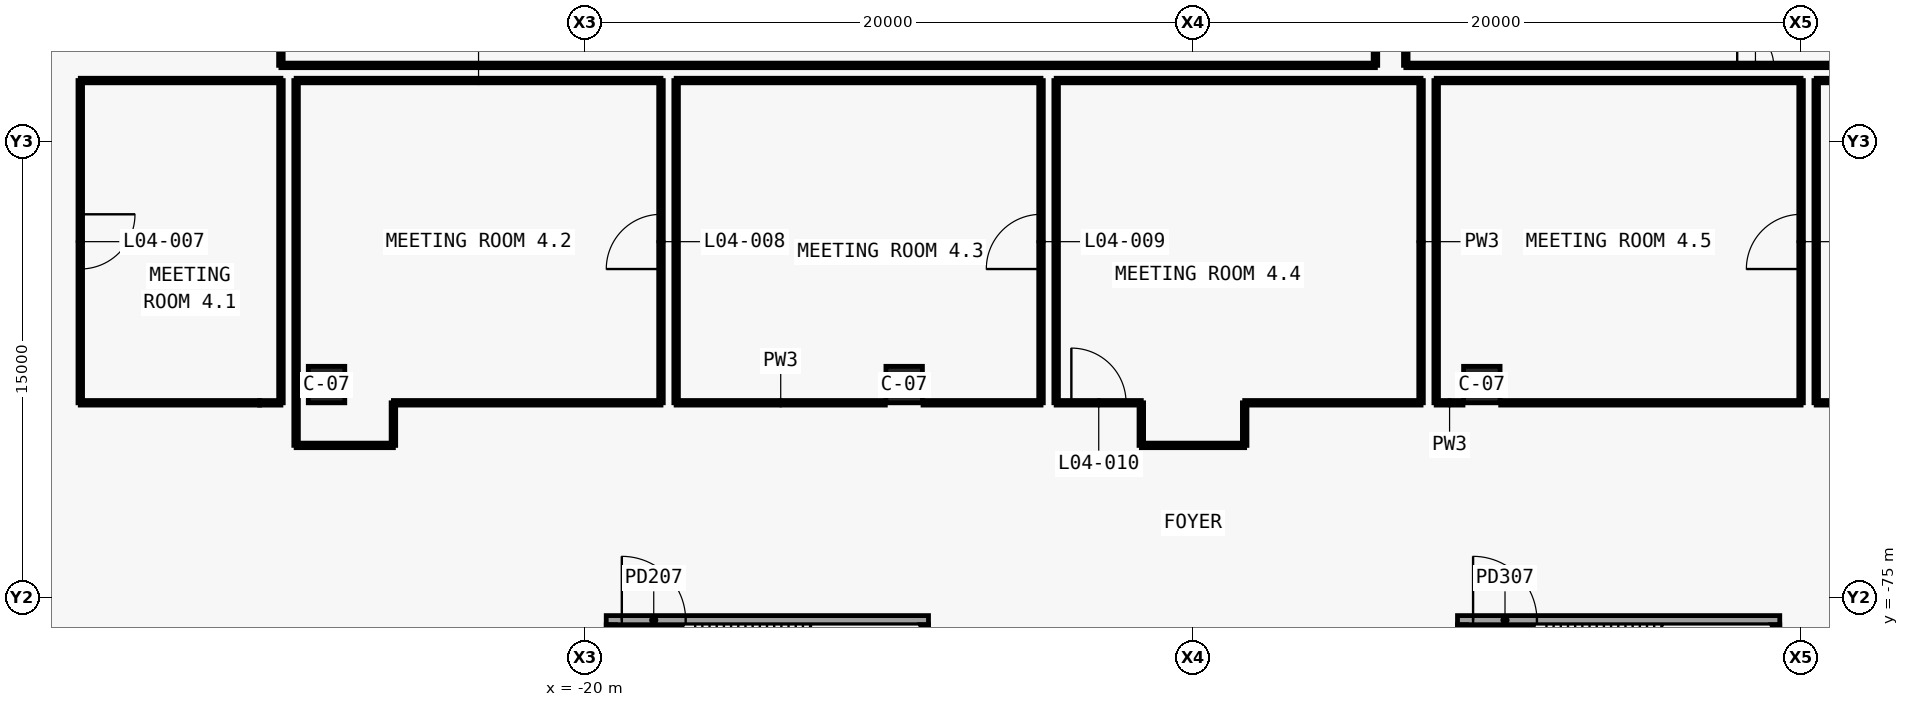
"""IFC4 building model, lengths in metres.
Left out: names, types, materials, properties, quantities, classifications, styles, units other than length and angle.
Written with IfcOpenShell. Run it as: python <this file> out.ifc"""

import sys

from ifc_helpers import new_model, si_unit, direction, frame, frame_2d, origin, origin_2d, place, context, subcontext, project, spatial, rectangle, extrude, element, fill, save


model = new_model("IFC4")
c1 = context("Model", 3, precision=1e-05, world=origin(), true_north=direction((0.0, 1.0)))
c2 = subcontext(c1, "Body", "Model", "MODEL_VIEW")
j1 = project(units=[si_unit("LENGTHUNIT", "METRE"), si_unit("PLANEANGLEUNIT", "RADIAN")], contexts=[c1])
p1 = place(None, origin())
s1 = spatial("IfcSite", under=j1, at=p1, CompositionType="ELEMENT")
p2 = place(p1, origin())
s2 = spatial("IfcBuilding", under=s1, at=p2, CompositionType="ELEMENT")
p3 = place(p2, frame((0.0, 0.0, 32.0)))
s3 = spatial("IfcBuildingStorey", under=s2, at=p3, CompositionType="ELEMENT", Elevation=32.0)
p4 = place(p3, frame((-19.3, -75.75, 0.0), z_axis=(0.0, 0.0, 1.0), x_axis=(1.0, 0.0, 0.0)))
e1 = element("IfcWall", 1, at=p4, inside=s3, PredefinedType="SOLIDWALL", context=c2, shape_type="SweptSolid", body=[
    extrude(rectangle(XDim=10.6, YDim=0.3, at=frame_2d((5.3, 0.0))), origin(), (0.0, 0.0, 1.0), 5.5),
])
p5 = place(p4, frame((0.512, 0.0, 0.0)))
e2 = element("IfcOpeningElement", 2, at=p5, cuts=e1, PredefinedType="OPENING", context=c2, shape_type="SweptSolid", body=[
    extrude(rectangle(XDim=2.1, YDim=2.1, at=frame_2d((1.05, 1.05))), frame((0.0, 0.16, 0.0), z_axis=(0.0, -1.0, 0.0), x_axis=(1.0, 0.0, 0.0)), (0.0, 0.0, 1.0), 0.32),
])
for number, where, z_axis, x_axis in (
    (3, (-19.15, -81.1, 0.0), (0.0, 0.0, 1.0), (0.0, 1.0, 0.0)),
    (4, (-8.85, -81.1, 0.0), (0.0, 0.0, 1.0), (0.0, 1.0, 0.0)),
):
    element("IfcWall", number, at=place(p3, frame(where, z_axis=z_axis, x_axis=x_axis)), inside=s3, PredefinedType="SOLIDWALL", context=c2, shape_type="SweptSolid", body=[
        extrude(rectangle(XDim=5.2, YDim=0.3, at=frame_2d((2.6, 0.0))), origin(), (0.0, 0.0, 1.0), 5.5),
    ])
p6 = place(p3, frame((8.7, -75.75, 0.0), z_axis=(0.0, 0.0, 1.0), x_axis=(1.0, 0.0, 0.0)))
e5 = element("IfcWall", 5, at=p6, inside=s3, PredefinedType="SOLIDWALL", context=c2, shape_type="SweptSolid", body=[
    extrude(rectangle(XDim=10.6, YDim=0.3, at=frame_2d((5.3, 0.0))), origin(), (0.0, 0.0, 1.0), 5.5),
])
p7 = place(p6, frame((0.512, 0.0, 0.0)))
e6 = element("IfcOpeningElement", 6, at=p7, cuts=e5, PredefinedType="OPENING", context=c2, shape_type="SweptSolid", body=[
    extrude(rectangle(XDim=2.1, YDim=2.1, at=frame_2d((1.05, 1.05))), frame((0.0, 0.16, 0.0), z_axis=(0.0, -1.0, 0.0), x_axis=(1.0, 0.0, 0.0)), (0.0, 0.0, 1.0), 0.32),
])
for number, where, z_axis, x_axis in (
    (7, (8.85, -81.1, 0.0), (0.0, 0.0, 1.0), (0.0, 1.0, 0.0)),
    (8, (19.15, -81.1, 0.0), (0.0, 0.0, 1.0), (0.0, 1.0, 0.0)),
):
    element("IfcWall", number, at=place(p3, frame(where, z_axis=z_axis, x_axis=x_axis)), inside=s3, PredefinedType="SOLIDWALL", context=c2, shape_type="SweptSolid", body=[
        extrude(rectangle(XDim=5.2, YDim=0.3, at=frame_2d((2.6, 0.0))), origin(), (0.0, 0.0, 1.0), 5.5),
    ])
for number, where, z_axis, x_axis in (
    (9, (-28.5, -68.0, 0.0), (0.0, 0.0, 1.0), (1.0, 0.0, 0.0)),
    (10, (-9.5, -68.0, 0.0), (0.0, 0.0, 1.0), (1.0, 0.0, 0.0)),
    (11, (9.5, -68.0, 0.0), (0.0, 0.0, 1.0), (1.0, 0.0, 0.0)),
):
    element("IfcColumn", number, at=place(p3, frame(where, z_axis=z_axis, x_axis=x_axis)), inside=s3, PredefinedType="COLUMN", context=c2, shape_type="SweptSolid", body=[
        extrude(rectangle(XDim=1.2, YDim=1.2, at=origin_2d()), origin(), (0.0, 0.0, 1.0), 5.5),
    ])
p8 = place(p3, frame((-30.699, -68.601, 0.0), z_axis=(0.0, 0.0, 1.0), x_axis=(1.0, 0.0, 0.0)))
e12 = element("IfcWall", 12, at=p8, inside=s3, PredefinedType="PARTITIONING", context=c2, shape_type="SweptSolid", body=[
    extrude(rectangle(XDim=0.699, YDim=0.15, at=frame_2d((0.35, 0.0))), origin(), (0.0, 0.0, 1.0), 5.1),
])
p9 = place(p3, frame((-29.999, -68.6, 0.0), z_axis=(0.0, 0.0, 1.0), x_axis=(0.0, 1.0, 0.0)))
e13 = element("IfcWall", 13, at=p9, inside=s3, PredefinedType="PARTITIONING", context=c2, shape_type="SweptSolid", body=[
    extrude(rectangle(XDim=10.6, YDim=0.15, at=frame_2d((5.3, 0.0))), origin(), (0.0, 0.0, 1.0), 4.28),
])
p10 = place(p3, frame((-30.0, -57.999, 0.0), z_axis=(0.0, 0.0, 1.0), x_axis=(-1.0, 0.0, 0.0)))
e14 = element("IfcWall", 14, at=p10, inside=s3, PredefinedType="PARTITIONING", context=c2, shape_type="SweptSolid", body=[
    extrude(rectangle(XDim=6.599, YDim=0.15, at=frame_2d((3.3, 0.0))), origin(), (0.0, 0.0, 1.0), 5.1),
])
p11 = place(p3, frame((-17.499, -68.599, 0.0), z_axis=(0.0, 0.0, 1.0), x_axis=(0.0, 1.0, 0.0)))
e15 = element("IfcWall", 15, at=p11, inside=s3, PredefinedType="PARTITIONING", context=c2, shape_type="SweptSolid", body=[
    extrude(rectangle(XDim=10.599, YDim=0.15, at=frame_2d((5.3, 0.0))), origin(), (0.0, 0.0, 1.0), 4.28),
])
p12 = place(p11, frame((4.399, 0.0, 0.0)))
e16 = element("IfcOpeningElement", 16, at=p12, cuts=e15, PredefinedType="OPENING", context=c2, shape_type="SweptSolid", body=[
    extrude(rectangle(XDim=1.8, YDim=2.4, at=frame_2d((0.9, 1.2))), frame((0.0, 0.085, 0.0), z_axis=(0.0, -1.0, 0.0), x_axis=(1.0, 0.0, 0.0)), (0.0, 0.0, 1.0), 0.17),
])
for number, where, z_axis, x_axis in (
    (17, (-17.5, -57.999, 0.0), (0.0, 0.0, 1.0), (-1.0, 0.0, 0.0)),
    (18, (-29.501, -58.0, 0.0), (0.0, 0.0, 1.0), (0.0, -1.0, 0.0)),
):
    element("IfcWall", number, at=place(p3, frame(where, z_axis=z_axis, x_axis=x_axis)), inside=s3, PredefinedType="PARTITIONING", context=c2, shape_type="SweptSolid", body=[
        extrude(rectangle(XDim=12.0, YDim=0.15, at=frame_2d((6.0, 0.0))), origin(), (0.0, 0.0, 1.0), 4.28),
    ])
p13 = place(p3, frame((-29.5, -70.001, 0.0), z_axis=(0.0, 0.0, 1.0), x_axis=(1.0, 0.0, 0.0)))
e19 = element("IfcWall", 19, at=p13, inside=s3, PredefinedType="PARTITIONING", context=c2, shape_type="SweptSolid", body=[
    extrude(rectangle(XDim=3.199, YDim=0.15, at=frame_2d((1.6, 0.0))), origin(), (0.0, 0.0, 1.0), 4.28),
])
p14 = place(p3, frame((-4.999, -68.599, 0.0), z_axis=(0.0, 0.0, 1.0), x_axis=(0.0, 1.0, 0.0)))
e20 = element("IfcWall", 20, at=p14, inside=s3, PredefinedType="PARTITIONING", context=c2, shape_type="SweptSolid", body=[
    extrude(rectangle(XDim=10.599, YDim=0.15, at=frame_2d((5.3, 0.0))), origin(), (0.0, 0.0, 1.0), 4.28),
])
p15 = place(p14, frame((4.399, 0.0, 0.0)))
e21 = element("IfcOpeningElement", 21, at=p15, cuts=e20, PredefinedType="OPENING", context=c2, shape_type="SweptSolid", body=[
    extrude(rectangle(XDim=1.8, YDim=2.4, at=frame_2d((0.9, 1.2))), frame((0.0, 0.085, 0.0), z_axis=(0.0, -1.0, 0.0), x_axis=(1.0, 0.0, 0.0)), (0.0, 0.0, 1.0), 0.17),
])
p16 = place(p3, frame((-5.0, -57.999, 0.0), z_axis=(0.0, 0.0, 1.0), x_axis=(-1.0, 0.0, 0.0)))
e22 = element("IfcWall", 22, at=p16, inside=s3, PredefinedType="PARTITIONING", context=c2, shape_type="SweptSolid", body=[
    extrude(rectangle(XDim=12.0, YDim=0.15, at=frame_2d((6.0, 0.0))), origin(), (0.0, 0.0, 1.0), 4.28),
])
for number, where, z_axis, x_axis in (
    (23, (-17.001, -58.0, 0.0), (0.0, 0.0, 1.0), (0.0, -1.0, 0.0)),
    (24, (7.501, -68.599, 0.0), (0.0, 0.0, 1.0), (0.0, 1.0, 0.0)),
):
    element("IfcWall", number, at=place(p3, frame(where, z_axis=z_axis, x_axis=x_axis)), inside=s3, PredefinedType="PARTITIONING", context=c2, shape_type="SweptSolid", body=[
        extrude(rectangle(XDim=10.599, YDim=0.15, at=frame_2d((5.3, 0.0))), origin(), (0.0, 0.0, 1.0), 4.28),
    ])
p17 = place(p3, frame((7.5, -57.999, 0.0), z_axis=(0.0, 0.0, 1.0), x_axis=(-1.0, 0.0, 0.0)))
e25 = element("IfcWall", 25, at=p17, inside=s3, PredefinedType="PARTITIONING", context=c2, shape_type="SweptSolid", body=[
    extrude(rectangle(XDim=12.0, YDim=0.15, at=frame_2d((6.0, 0.0))), origin(), (0.0, 0.0, 1.0), 5.1),
])
p18 = place(p3, frame((-4.501, -58.0, 0.0), z_axis=(0.0, 0.0, 1.0), x_axis=(0.0, -1.0, 0.0)))
e26 = element("IfcWall", 26, at=p18, inside=s3, PredefinedType="PARTITIONING", context=c2, shape_type="SweptSolid", body=[
    extrude(rectangle(XDim=10.599, YDim=0.15, at=frame_2d((5.3, 0.0))), origin(), (0.0, 0.0, 1.0), 4.28),
])
p19 = place(p3, frame((20.001, -68.599, 0.0), z_axis=(0.0, 0.0, 1.0), x_axis=(0.0, 1.0, 0.0)))
e27 = element("IfcWall", 27, at=p19, inside=s3, PredefinedType="PARTITIONING", context=c2, shape_type="SweptSolid", body=[
    extrude(rectangle(XDim=10.599, YDim=0.15, at=frame_2d((5.3, 0.0))), origin(), (0.0, 0.0, 1.0), 4.28),
])
p20 = place(p19, frame((4.399, 0.0, 0.0)))
e28 = element("IfcOpeningElement", 28, at=p20, cuts=e27, PredefinedType="OPENING", context=c2, shape_type="SweptSolid", body=[
    extrude(rectangle(XDim=1.8, YDim=2.4, at=frame_2d((0.9, 1.2))), frame((0.0, 0.085, 0.0), z_axis=(0.0, -1.0, 0.0), x_axis=(1.0, 0.0, 0.0)), (0.0, 0.0, 1.0), 0.17),
])
p21 = place(p3, frame((20.0, -57.999, 0.0), z_axis=(0.0, 0.0, 1.0), x_axis=(-1.0, 0.0, 0.0)))
e29 = element("IfcWall", 29, at=p21, inside=s3, PredefinedType="PARTITIONING", context=c2, shape_type="SweptSolid", body=[
    extrude(rectangle(XDim=12.0, YDim=0.15, at=frame_2d((6.0, 0.0))), origin(), (0.0, 0.0, 1.0), 4.28),
])
p22 = place(p3, frame((7.999, -58.0, 0.0), z_axis=(0.0, 0.0, 1.0), x_axis=(0.0, -1.0, 0.0)))
e30 = element("IfcWall", 30, at=p22, inside=s3, PredefinedType="PARTITIONING", context=c2, shape_type="SweptSolid", body=[
    extrude(rectangle(XDim=10.599, YDim=0.15, at=frame_2d((5.3, 0.0))), origin(), (0.0, 0.0, 1.0), 4.28),
])
p23 = place(p3, frame((32.5, -57.999, 0.0), z_axis=(0.0, 0.0, 1.0), x_axis=(-1.0, 0.0, 0.0)))
e31 = element("IfcWall", 31, at=p23, inside=s3, PredefinedType="PARTITIONING", context=c2, shape_type="SweptSolid", body=[
    extrude(rectangle(XDim=12.0, YDim=0.15, at=frame_2d((6.0, 0.0))), origin(), (0.0, 0.0, 1.0), 4.28),
])
p24 = place(p3, frame((20.499, -58.0, 0.0), z_axis=(0.0, 0.0, 1.0), x_axis=(0.0, -1.0, 0.0)))
e32 = element("IfcWall", 32, at=p24, inside=s3, PredefinedType="PARTITIONING", context=c2, shape_type="SweptSolid", body=[
    extrude(rectangle(XDim=10.599, YDim=0.15, at=frame_2d((5.3, 0.0))), origin(), (0.0, 0.0, 1.0), 4.28),
])
p25 = place(p3, frame((-30.001, -46.0, 0.0), z_axis=(0.0, 0.0, 1.0), x_axis=(0.0, -1.0, 0.0)))
e33 = element("IfcWall", 33, at=p25, inside=s3, PredefinedType="PARTITIONING", context=c2, shape_type="SweptSolid", body=[
    extrude(rectangle(XDim=11.5, YDim=0.15, at=frame_2d((5.75, 0.0))), origin(), (0.0, 0.0, 1.0), 4.28),
])
p26 = place(p3, frame((-30.0, -57.501, 0.0), z_axis=(0.0, 0.0, 1.0), x_axis=(1.0, 0.0, 0.0)))
e34 = element("IfcWall", 34, at=p26, inside=s3, PredefinedType="PARTITIONING", context=c2, shape_type="SweptSolid", body=[
    extrude(rectangle(XDim=36.0, YDim=0.15, at=frame_2d((18.0, 0.0))), origin(), (0.0, 0.0, 1.0), 4.28),
])
for number, where, z_axis, x_axis in (
    (35, (6.001, -57.5, 0.0), (0.0, 0.0, 1.0), (0.0, 1.0, 0.0)),
    (36, (6.999, -55.587, 0.0), (0.0, 0.0, 1.0), (0.0, -1.0, 0.0)),
):
    element("IfcWall", number, at=place(p3, frame(where, z_axis=z_axis, x_axis=x_axis)), inside=s3, PredefinedType="PARTITIONING", context=c2, shape_type="SweptSolid", body=[
        extrude(rectangle(XDim=1.913, YDim=0.15, at=frame_2d((0.957, 0.0))), origin(), (0.0, 0.0, 1.0), 4.63),
    ])
p27 = place(p3, frame((7.0, -57.501, 0.0), z_axis=(0.0, 0.0, 1.0), x_axis=(1.0, 0.0, 0.0)))
e37 = element("IfcWall", 37, at=p27, inside=s3, PredefinedType="PARTITIONING", context=c2, shape_type="SweptSolid", body=[
    extrude(rectangle(XDim=23.0, YDim=0.15, at=frame_2d((11.5, 0.0))), origin(), (0.0, 0.0, 1.0), 4.28),
])
p28 = place(p27, frame((10.9, 0.0, 0.0)))
e38 = element("IfcOpeningElement", 38, at=p28, cuts=e37, PredefinedType="OPENING", context=c2, shape_type="SweptSolid", body=[
    extrude(rectangle(XDim=1.2, YDim=2.4, at=frame_2d((0.6, 1.2))), frame((0.0, 0.085, 0.0), z_axis=(0.0, -1.0, 0.0), x_axis=(1.0, 0.0, 0.0)), (0.0, 0.0, 1.0), 0.17),
])
p29 = place(p3, frame((-1.699, -70.001, 0.0), z_axis=(0.0, 0.0, 1.0), x_axis=(1.0, 0.0, 0.0)))
e39 = element("IfcWall", 39, at=p29, inside=s3, PredefinedType="PARTITIONING", context=c2, shape_type="SweptSolid", body=[
    extrude(rectangle(XDim=3.398, YDim=0.15, at=frame_2d((1.699, 0.0))), origin(), (0.0, 0.0, 1.0), 5.1),
])
p30 = place(p3, frame((-36.6, -57.998, 0.0), z_axis=(0.0, 0.0, 1.0), x_axis=(0.0, -1.0, 0.0)))
e40 = element("IfcWall", 40, at=p30, inside=s3, PredefinedType="PARTITIONING", context=c2, shape_type="SweptSolid", body=[
    extrude(rectangle(XDim=10.602, YDim=0.15, at=frame_2d((5.301, 0.0))), origin(), (0.0, 0.0, 1.0), 4.28),
])
p31 = place(p30, frame((4.401, 0.0, 0.0)))
e41 = element("IfcOpeningElement", 41, at=p31, cuts=e40, PredefinedType="OPENING", context=c2, shape_type="SweptSolid", body=[
    extrude(rectangle(XDim=1.8, YDim=2.4, at=frame_2d((0.9, 1.2))), frame((0.0, 0.085, 0.0), z_axis=(0.0, -1.0, 0.0), x_axis=(1.0, 0.0, 0.0)), (0.0, 0.0, 1.0), 0.17),
])
p32 = place(p3, frame((-36.6, -68.6, 0.0), z_axis=(0.0, 0.0, 1.0), x_axis=(1.0, 0.0, 0.0)))
e42 = element("IfcWall", 42, at=p32, inside=s3, PredefinedType="PARTITIONING", context=c2, shape_type="SweptSolid", body=[
    extrude(rectangle(XDim=5.9, YDim=0.15, at=frame_2d((2.95, 0.0))), origin(), (0.0, 0.0, 1.0), 5.1),
])
p33 = place(p3, frame((-26.3, -70.002, 0.0), z_axis=(0.0, 0.0, 1.0), x_axis=(0.0, 1.0, 0.0)))
e43 = element("IfcWall", 43, at=p33, inside=s3, PredefinedType="PARTITIONING", context=c2, shape_type="SweptSolid", body=[
    extrude(rectangle(XDim=1.402, YDim=0.15, at=frame_2d((0.701, 0.0))), origin(), (0.0, 0.0, 1.0), 5.1),
])
p34 = place(p3, frame((-26.3, -68.6, 0.0), z_axis=(0.0, 0.0, 1.0), x_axis=(1.0, 0.0, 0.0)))
e44 = element("IfcWall", 44, at=p34, inside=s3, PredefinedType="PARTITIONING", context=c2, shape_type="SweptSolid", body=[
    extrude(rectangle(XDim=8.802, YDim=0.15, at=frame_2d((4.401, 0.0))), origin(), (0.0, 0.0, 1.0), 5.1),
])
p35 = place(p3, frame((-17.002, -68.6, 0.0), z_axis=(0.0, 0.0, 1.0), x_axis=(1.0, 0.0, 0.0)))
e45 = element("IfcWall", 45, at=p35, inside=s3, PredefinedType="PARTITIONING", context=c2, shape_type="SweptSolid", body=[
    extrude(rectangle(XDim=6.882, YDim=0.15, at=frame_2d((3.441, 0.0))), origin(), (0.0, 0.0, 1.0), 5.1),
])
p36 = place(p3, frame((-8.88, -68.6, 0.0), z_axis=(0.0, 0.0, 1.0), x_axis=(1.0, 0.0, 0.0)))
e46 = element("IfcWall", 46, at=p36, inside=s3, PredefinedType="PARTITIONING", context=c2, shape_type="SweptSolid", body=[
    extrude(rectangle(XDim=3.882, YDim=0.15, at=frame_2d((1.941, 0.0))), origin(), (0.0, 0.0, 1.0), 5.1),
])
p37 = place(p3, frame((-4.502, -68.6, 0.0), z_axis=(0.0, 0.0, 1.0), x_axis=(1.0, 0.0, 0.0)))
e47 = element("IfcWall", 47, at=p37, inside=s3, PredefinedType="PARTITIONING", context=c2, shape_type="SweptSolid", body=[
    extrude(rectangle(XDim=2.802, YDim=0.15, at=frame_2d((1.401, 0.0))), origin(), (0.0, 0.0, 1.0), 5.1),
])
p38 = place(p37, frame((0.501, 0.0, 0.0)))
e48 = element("IfcOpeningElement", 48, at=p38, cuts=e47, PredefinedType="OPENING", context=c2, shape_type="SweptSolid", body=[
    extrude(rectangle(XDim=1.8, YDim=2.4, at=frame_2d((0.9, 1.2))), frame((0.0, 0.085, 0.0), z_axis=(0.0, -1.0, 0.0), x_axis=(1.0, 0.0, 0.0)), (0.0, 0.0, 1.0), 0.17),
])
for number, where, z_axis, x_axis in (
    (49, (-1.7, -68.6, 0.0), (0.0, 0.0, 1.0), (0.0, -1.0, 0.0)),
    (50, (1.7, -70.002, 0.0), (0.0, 0.0, 1.0), (0.0, 1.0, 0.0)),
):
    element("IfcWall", number, at=place(p3, frame(where, z_axis=z_axis, x_axis=x_axis)), inside=s3, PredefinedType="PARTITIONING", context=c2, shape_type="SweptSolid", body=[
        extrude(rectangle(XDim=1.402, YDim=0.15, at=frame_2d((0.701, 0.0))), origin(), (0.0, 0.0, 1.0), 5.1),
    ])
p39 = place(p3, frame((1.7, -68.6, 0.0), z_axis=(0.0, 0.0, 1.0), x_axis=(1.0, 0.0, 0.0)))
e51 = element("IfcWall", 51, at=p39, inside=s3, PredefinedType="PARTITIONING", context=c2, shape_type="SweptSolid", body=[
    extrude(rectangle(XDim=5.802, YDim=0.15, at=frame_2d((2.901, 0.0))), origin(), (0.0, 0.0, 1.0), 5.1),
])
p40 = place(p3, frame((7.998, -68.6, 0.0), z_axis=(0.0, 0.0, 1.0), x_axis=(1.0, 0.0, 0.0)))
e52 = element("IfcWall", 52, at=p40, inside=s3, PredefinedType="PARTITIONING", context=c2, shape_type="SweptSolid", body=[
    extrude(rectangle(XDim=0.882, YDim=0.15, at=frame_2d((0.441, 0.0))), origin(), (0.0, 0.0, 1.0), 5.1),
])
p41 = place(p3, frame((10.12, -68.6, 0.0), z_axis=(0.0, 0.0, 1.0), x_axis=(1.0, 0.0, 0.0)))
e53 = element("IfcWall", 53, at=p41, inside=s3, PredefinedType="PARTITIONING", context=c2, shape_type="SweptSolid", body=[
    extrude(rectangle(XDim=9.882, YDim=0.15, at=frame_2d((4.941, 0.0))), origin(), (0.0, 0.0, 1.0), 5.1),
])
p42 = place(p3, frame((20.498, -68.6, 0.0), z_axis=(0.0, 0.0, 1.0), x_axis=(1.0, 0.0, 0.0)))
e54 = element("IfcWall", 54, at=p42, inside=s3, PredefinedType="PARTITIONING", context=c2, shape_type="SweptSolid", body=[
    extrude(rectangle(XDim=5.802, YDim=0.15, at=frame_2d((2.901, 0.0))), origin(), (0.0, 0.0, 1.0), 5.1),
])
p43 = place(p42, frame((2.001, 0.0, 0.0)))
e55 = element("IfcOpeningElement", 55, at=p43, cuts=e54, PredefinedType="OPENING", context=c2, shape_type="SweptSolid", body=[
    extrude(rectangle(XDim=1.8, YDim=2.4, at=frame_2d((0.9, 1.2))), frame((0.0, 0.085, 0.0), z_axis=(0.0, -1.0, 0.0), x_axis=(1.0, 0.0, 0.0)), (0.0, 0.0, 1.0), 0.17),
])
p44 = place(p5, origin())
e56 = element("IfcDoor", 56, at=p44, inside=s3, OperationType="DOUBLE_DOOR_SINGLE_SWING", PredefinedType="DOOR", context=c2, shape_type="SweptSolid", body=[
    extrude(rectangle(XDim=2.1, YDim=2.1, at=frame_2d((1.05, 1.05))), frame((0.0, 0.025, 0.0), z_axis=(0.0, -1.0, 0.0), x_axis=(1.0, 0.0, 0.0)), (0.0, 0.0, 1.0), 0.05),
])
fill(e2, e56)
p45 = place(p7, origin())
e57 = element("IfcDoor", 57, at=p45, inside=s3, OperationType="DOUBLE_DOOR_SINGLE_SWING", PredefinedType="DOOR", context=c2, shape_type="SweptSolid", body=[
    extrude(rectangle(XDim=2.1, YDim=2.1, at=frame_2d((1.05, 1.05))), frame((0.0, 0.025, 0.0), z_axis=(0.0, -1.0, 0.0), x_axis=(1.0, 0.0, 0.0)), (0.0, 0.0, 1.0), 0.05),
])
fill(e6, e57)
p46 = place(p31, origin())
e58 = element("IfcDoor", 58, at=p46, inside=s3, OperationType="DOUBLE_DOOR_SINGLE_SWING", PredefinedType="DOOR", context=c2, shape_type="SweptSolid", body=[
    extrude(rectangle(XDim=1.8, YDim=2.4, at=frame_2d((0.9, 1.2))), frame((0.0, 0.025, 0.0), z_axis=(0.0, -1.0, 0.0), x_axis=(1.0, 0.0, 0.0)), (0.0, 0.0, 1.0), 0.05),
])
fill(e41, e58)
p47 = place(p12, origin())
e59 = element("IfcDoor", 59, at=p47, inside=s3, OperationType="DOUBLE_DOOR_SINGLE_SWING", PredefinedType="DOOR", context=c2, shape_type="SweptSolid", body=[
    extrude(rectangle(XDim=1.8, YDim=2.4, at=frame_2d((0.9, 1.2))), frame((0.0, 0.025, 0.0), z_axis=(0.0, -1.0, 0.0), x_axis=(1.0, 0.0, 0.0)), (0.0, 0.0, 1.0), 0.05),
])
fill(e16, e59)
p48 = place(p15, origin())
e60 = element("IfcDoor", 60, at=p48, inside=s3, OperationType="DOUBLE_DOOR_SINGLE_SWING", PredefinedType="DOOR", context=c2, shape_type="SweptSolid", body=[
    extrude(rectangle(XDim=1.8, YDim=2.4, at=frame_2d((0.9, 1.2))), frame((0.0, 0.025, 0.0), z_axis=(0.0, -1.0, 0.0), x_axis=(1.0, 0.0, 0.0)), (0.0, 0.0, 1.0), 0.05),
])
fill(e21, e60)
p49 = place(p38, origin())
e61 = element("IfcDoor", 61, at=p49, inside=s3, OperationType="DOUBLE_DOOR_SINGLE_SWING", PredefinedType="DOOR", context=c2, shape_type="SweptSolid", body=[
    extrude(rectangle(XDim=1.8, YDim=2.4, at=frame_2d((0.9, 1.2))), frame((0.0, 0.025, 0.0), z_axis=(0.0, -1.0, 0.0), x_axis=(1.0, 0.0, 0.0)), (0.0, 0.0, 1.0), 0.05),
])
fill(e48, e61)
p50 = place(p20, origin())
e62 = element("IfcDoor", 62, at=p50, inside=s3, OperationType="DOUBLE_DOOR_SINGLE_SWING", PredefinedType="DOOR", context=c2, shape_type="SweptSolid", body=[
    extrude(rectangle(XDim=1.8, YDim=2.4, at=frame_2d((0.9, 1.2))), frame((0.0, 0.025, 0.0), z_axis=(0.0, -1.0, 0.0), x_axis=(1.0, 0.0, 0.0)), (0.0, 0.0, 1.0), 0.05),
])
fill(e28, e62)
p51 = place(p28, origin())
e63 = element("IfcDoor", 63, at=p51, inside=s3, OperationType="DOUBLE_DOOR_SINGLE_SWING", PredefinedType="DOOR", context=c2, shape_type="SweptSolid", body=[
    extrude(rectangle(XDim=1.2, YDim=2.4, at=frame_2d((0.6, 1.2))), frame((0.0, 0.025, 0.0), z_axis=(0.0, -1.0, 0.0), x_axis=(1.0, 0.0, 0.0)), (0.0, 0.0, 1.0), 0.05),
])
fill(e38, e63)
save(model, sys.argv[1])
